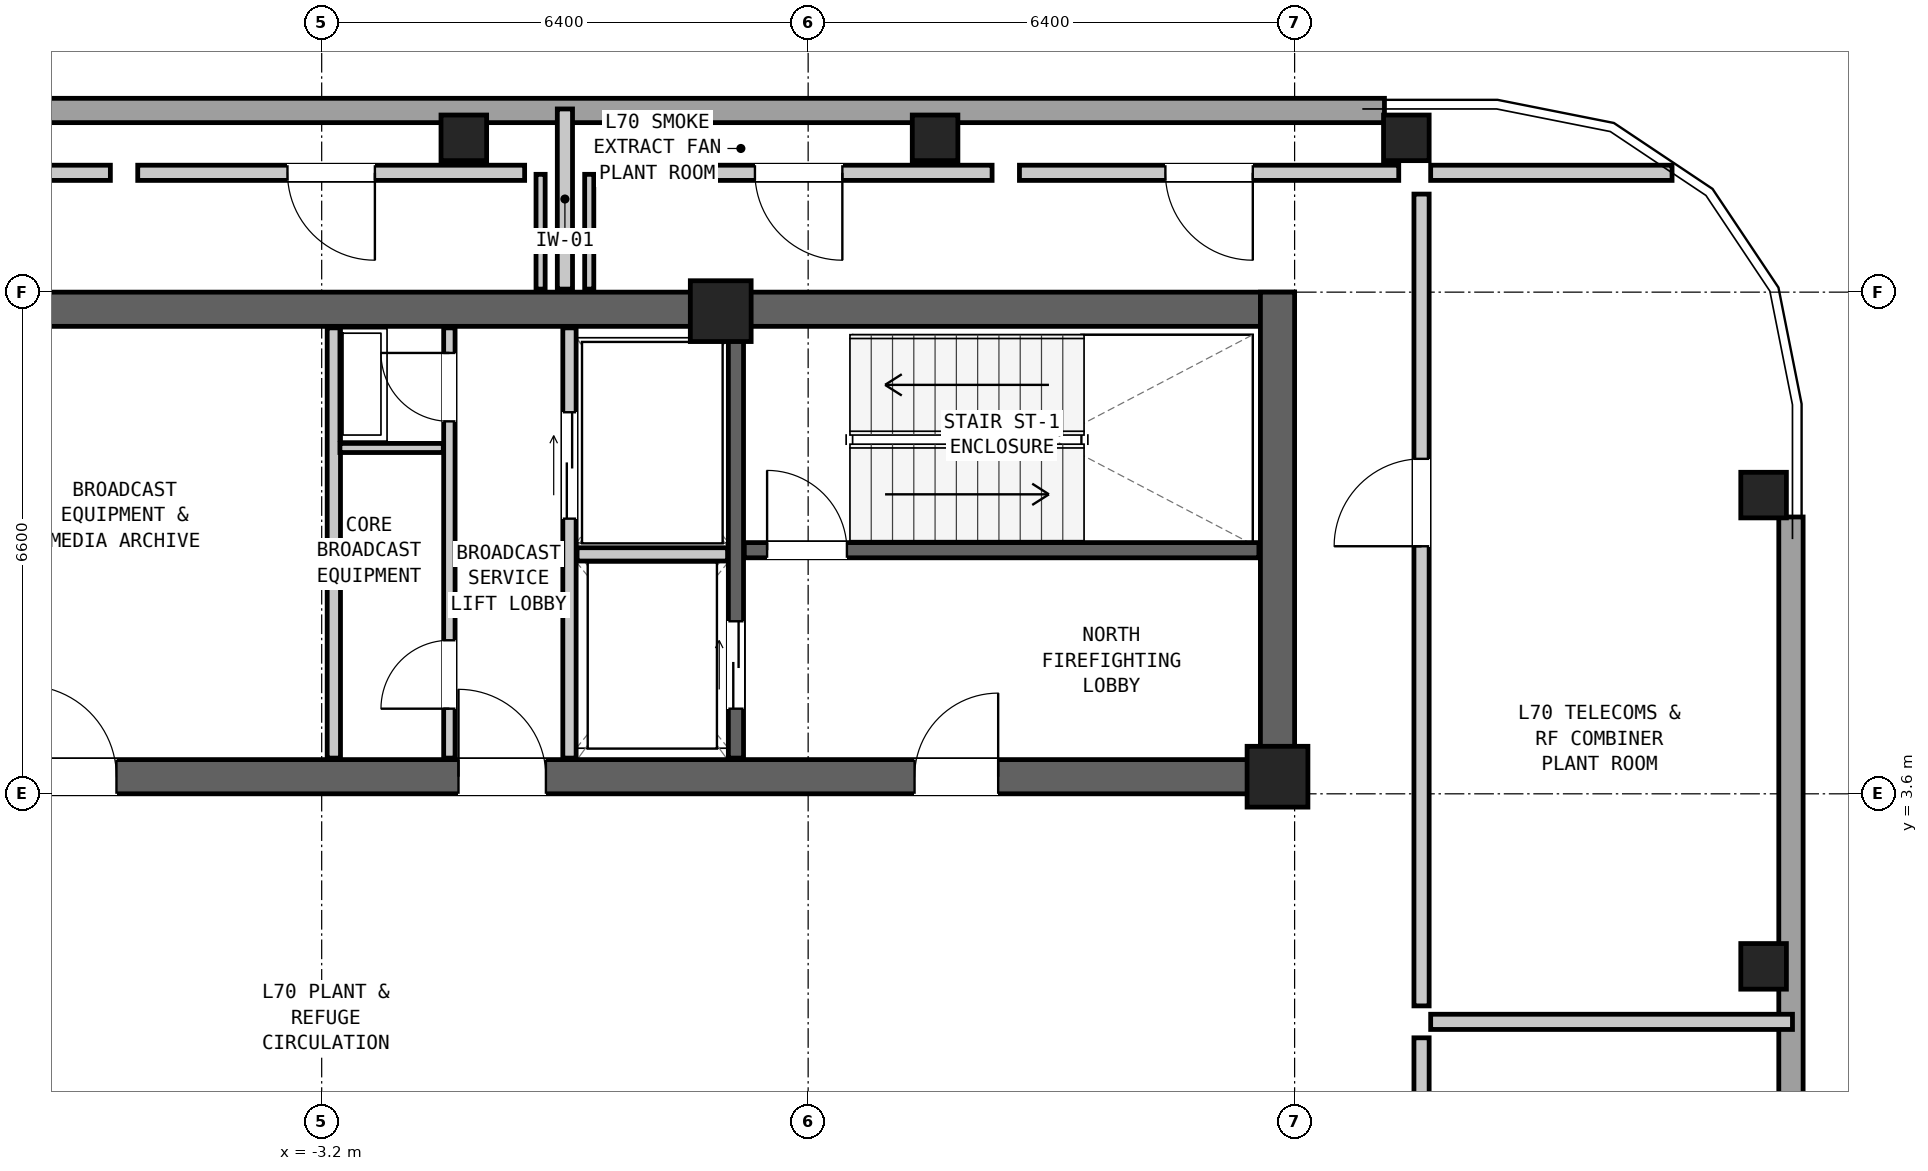
"""IFC4 building model, lengths in metres.
Left out: names, types, materials, properties, quantities, classifications, styles, units other than length and angle.
Written with IfcOpenShell. Run it as: python <this file> out.ifc"""

import sys

from ifc_helpers import new_model, si_unit, direction, frame, frame_2d, origin, origin_2d, place, context, subcontext, project, spatial, rectangle, hollow_rectangle, extrude, element, fill, save


model = new_model("IFC4")
c1 = context("Model", 3, precision=1e-05, world=origin(), true_north=direction((0.0, 1.0)))
c2 = subcontext(c1, "Body", "Model", "MODEL_VIEW")
j1 = project(units=[si_unit("LENGTHUNIT", "METRE"), si_unit("PLANEANGLEUNIT", "RADIAN")], contexts=[c1])
p1 = place(None, origin())
s1 = spatial("IfcSite", under=j1, at=p1, CompositionType="ELEMENT")
p2 = place(p1, origin())
s2 = spatial("IfcBuilding", under=s1, at=p2, CompositionType="ELEMENT")
p3 = place(p2, frame((0.0, 0.0, 238.5)))
s3 = spatial("IfcBuildingStorey", under=s2, at=p3, CompositionType="ELEMENT", Elevation=238.5)
p4 = place(p3, frame((-9.6, 9.975, 0.0), z_axis=(0.0, 0.0, 1.0), x_axis=(1.0, 0.0, 0.0)))
e1 = element("IfcWall", 1, at=p4, inside=s3, PredefinedType="SHEAR", context=c2, shape_type="SweptSolid", body=[
    extrude(rectangle(XDim=19.2, YDim=0.45, at=frame_2d((9.6, 0.0))), origin(), (0.0, 0.0, 1.0), 4.35),
])
p5 = place(p3, frame((-9.6, 3.825, 0.0), z_axis=(0.0, 0.0, 1.0), x_axis=(1.0, 0.0, 0.0)))
e2 = element("IfcWall", 2, at=p5, inside=s3, PredefinedType="SHEAR", context=c2, shape_type="SweptSolid", body=[
    extrude(rectangle(XDim=19.2, YDim=0.45, at=frame_2d((9.6, 0.0))), origin(), (0.0, 0.0, 1.0), 4.35),
])
p6 = place(p5, frame((14.2, 0.0, 0.0)))
e3 = element("IfcOpeningElement", 3, at=p6, cuts=e2, PredefinedType="OPENING", context=c2, shape_type="SweptSolid", body=[
    extrude(rectangle(XDim=1.1, YDim=2.08, at=frame_2d((0.55, 1.04))), frame((0.0, 0.237, 0.0), z_axis=(0.0, -1.0, 0.0), x_axis=(1.0, 0.0, 0.0)), (0.0, 0.0, 1.0), 0.474),
])
p7 = place(p5, frame((8.2, 0.0, 0.0)))
e4 = element("IfcOpeningElement", 4, at=p7, cuts=e2, PredefinedType="OPENING", context=c2, shape_type="SweptSolid", body=[
    extrude(rectangle(XDim=1.15, YDim=2.1, at=frame_2d((0.575, 1.05))), frame((0.0, 0.237, 0.0), z_axis=(0.0, -1.0, 0.0), x_axis=(1.0, 0.0, 0.0)), (0.0, 0.0, 1.0), 0.474),
])
p8 = place(p5, frame((2.5, 0.0, 0.0)))
e5 = element("IfcOpeningElement", 5, at=p8, cuts=e2, PredefinedType="OPENING", context=c2, shape_type="SweptSolid", body=[
    extrude(rectangle(XDim=1.2, YDim=2.1, at=frame_2d((0.6, 1.05))), frame((0.0, 0.237, 0.0), z_axis=(0.0, -1.0, 0.0), x_axis=(1.0, 0.0, 0.0)), (0.0, 0.0, 1.0), 0.474),
])
p9 = place(p3, frame((9.375, 3.6, 0.0), z_axis=(0.0, 0.0, 1.0), x_axis=(0.0, 1.0, 0.0)))
e6 = element("IfcWall", 6, at=p9, inside=s3, PredefinedType="SHEAR", context=c2, shape_type="SweptSolid", body=[
    extrude(rectangle(XDim=6.6, YDim=0.45, at=frame_2d((3.3, 0.0))), origin(), (0.0, 0.0, 1.0), 4.35),
])
for number, where, z_axis, x_axis in (
    (7, (15.77, 1.33, 0.0), (0.0, 0.0, 1.0), (0.0, 1.0, 0.0)),
    (8, (15.77, 7.53, 0.0), (0.0, 0.0, 1.0), (0.0, 1.0, 0.0)),
    (9, (11.07, 12.23, 0.0), (0.0, 0.0, 1.0), (1.0, 0.0, 0.0)),
    (10, (4.87, 12.23, 0.0), (0.0, 0.0, 1.0), (1.0, 0.0, 0.0)),
    (11, (-1.33, 12.23, 0.0), (0.0, 0.0, 1.0), (1.0, 0.0, 0.0)),
):
    element("IfcColumn", number, at=place(p3, frame(where, z_axis=z_axis, x_axis=x_axis)), inside=s3, PredefinedType="COLUMN", context=c2, shape_type="SweptSolid", body=[
        extrude(hollow_rectangle(XDim=0.6, YDim=0.6, WallThickness=0.04, at=origin_2d()), origin(), (0.0, 0.0, 1.0), 4.35),
    ])
for number, where, z_axis, x_axis in (
    (12, (2.05, 9.95, 0.0), (0.0, 0.0, 1.0), (1.0, 0.0, 0.0)),
    (13, (9.375, 3.825, 0.0), (0.0, 0.0, 1.0), (1.0, 0.0, 0.0)),
):
    element("IfcColumn", number, at=place(p3, frame(where, z_axis=z_axis, x_axis=x_axis)), inside=s3, PredefinedType="COLUMN", context=c2, shape_type="SweptSolid", body=[
        extrude(rectangle(XDim=0.8, YDim=0.8, at=origin_2d()), origin(), (0.0, 0.0, 1.0), 4.35),
    ])
for number, where, z_axis, x_axis in (
    (14, (16.13, 7.242, 0.0), (0.0, 0.0, 1.0), (0.0, -1.0, 0.0)),
    (15, (-7.242, 12.59, 0.0), (0.0, 0.0, 1.0), (1.0, 0.0, 0.0)),
):
    element("IfcWall", number, at=place(p3, frame(where, z_axis=z_axis, x_axis=x_axis)), inside=s3, PredefinedType="SOLIDWALL", context=c2, shape_type="SweptSolid", body=[
        extrude(rectangle(XDim=18.024, YDim=0.32, at=frame_2d((9.012, 0.0))), origin(), (0.0, 0.0, 1.0), 2.34),
    ])
p10 = place(p3, frame((2.36, 6.805, 0.0), z_axis=(0.0, 0.0, 1.0), x_axis=(1.0, 0.0, 0.0)))
e16 = element("IfcWall", 16, at=p10, inside=s3, PredefinedType="SHEAR", context=c2, shape_type="SweptSolid", body=[
    extrude(rectangle(XDim=6.77, YDim=0.2, at=frame_2d((3.385, 0.0))), origin(), (0.0, 0.0, 1.0), 4.16),
])
p11 = place(p10, frame((0.3, 0.0, 0.0)))
e17 = element("IfcOpeningElement", 17, at=p11, cuts=e16, PredefinedType="OPENING", context=c2, shape_type="SweptSolid", body=[
    extrude(rectangle(XDim=1.05, YDim=2.08, at=frame_2d((0.525, 1.04))), frame((0.0, 0.112, 0.0), z_axis=(0.0, -1.0, 0.0), x_axis=(1.0, 0.0, 0.0)), (0.0, 0.0, 1.0), 0.224),
])
p12 = place(p3, frame((2.25, 4.07, 0.0), z_axis=(0.0, 0.0, 1.0), x_axis=(0.0, 1.0, 0.0)))
e18 = element("IfcWall", 18, at=p12, inside=s3, PredefinedType="SHEAR", context=c2, shape_type="SweptSolid", body=[
    extrude(rectangle(XDim=5.66, YDim=0.2, at=frame_2d((2.83, 0.0))), origin(), (0.0, 0.0, 1.0), 4.16),
])
p13 = place(p12, frame((0.65, 0.0, 0.0)))
e19 = element("IfcOpeningElement", 19, at=p13, cuts=e18, PredefinedType="OPENING", context=c2, shape_type="SweptSolid", body=[
    extrude(rectangle(XDim=1.15, YDim=2.08, at=frame_2d((0.575, 1.04))), frame((0.0, 0.112, 0.0), z_axis=(0.0, -1.0, 0.0), x_axis=(1.0, 0.0, 0.0)), (0.0, 0.0, 1.0), 0.224),
])
p14 = place(p3, frame((0.06, 4.07, 0.0), z_axis=(0.0, 0.0, 1.0), x_axis=(0.0, 1.0, 0.0)))
e20 = element("IfcWall", 20, at=p14, inside=s3, PredefinedType="PARTITIONING", context=c2, shape_type="SweptSolid", body=[
    extrude(rectangle(XDim=5.66, YDim=0.175, at=frame_2d((2.83, 0.0))), origin(), (0.0, 0.0, 1.0), 4.16),
])
p15 = place(p14, frame((3.15, 0.0, 0.0)))
e21 = element("IfcOpeningElement", 21, at=p15, cuts=e20, PredefinedType="OPENING", context=c2, shape_type="SweptSolid", body=[
    extrude(rectangle(XDim=1.4, YDim=2.12, at=frame_2d((0.7, 1.06))), frame((0.0, 0.1, 0.0), z_axis=(0.0, -1.0, 0.0), x_axis=(1.0, 0.0, 0.0)), (0.0, 0.0, 1.0), 0.199),
])
p16 = place(p3, frame((0.16, 6.75, 0.0), z_axis=(0.0, 0.0, 1.0), x_axis=(1.0, 0.0, 0.0)))
e22 = element("IfcWall", 22, at=p16, inside=s3, PredefinedType="PARTITIONING", context=c2, shape_type="SweptSolid", body=[
    extrude(rectangle(XDim=1.98, YDim=0.175, at=frame_2d((0.99, 0.0))), origin(), (0.0, 0.0, 1.0), 4.16),
])
p17 = place(p3, frame((-3.04, 4.07, 0.0), z_axis=(0.0, 0.0, 1.0), x_axis=(0.0, 1.0, 0.0)))
e23 = element("IfcWall", 23, at=p17, inside=s3, PredefinedType="PARTITIONING", context=c2, shape_type="SweptSolid", body=[
    extrude(rectangle(XDim=5.66, YDim=0.175, at=frame_2d((2.83, 0.0))), origin(), (0.0, 0.0, 1.0), 4.16),
])
p18 = place(p3, frame((-1.52, 4.07, 0.0), z_axis=(0.0, 0.0, 1.0), x_axis=(0.0, 1.0, 0.0)))
e24 = element("IfcWall", 24, at=p18, inside=s3, PredefinedType="PARTITIONING", context=c2, shape_type="SweptSolid", body=[
    extrude(rectangle(XDim=5.66, YDim=0.15, at=frame_2d((2.83, 0.0))), origin(), (0.0, 0.0, 1.0), 4.16),
])
p19 = place(p18, frame((4.43, 0.0, 0.0)))
e25 = element("IfcOpeningElement", 25, at=p19, cuts=e24, PredefinedType="OPENING", context=c2, shape_type="SweptSolid", body=[
    extrude(rectangle(XDim=0.9, YDim=2.05, at=frame_2d((0.45, 1.025))), frame((0.0, 0.087, 0.0), z_axis=(0.0, -1.0, 0.0), x_axis=(1.0, 0.0, 0.0)), (0.0, 0.0, 1.0), 0.174),
])
p20 = place(p18, frame((0.65, 0.0, 0.0)))
e26 = element("IfcOpeningElement", 26, at=p20, cuts=e24, PredefinedType="OPENING", context=c2, shape_type="SweptSolid", body=[
    extrude(rectangle(XDim=0.9, YDim=2.05, at=frame_2d((0.45, 1.025))), frame((0.0, 0.087, 0.0), z_axis=(0.0, -1.0, 0.0), x_axis=(1.0, 0.0, 0.0)), (0.0, 0.0, 1.0), 0.174),
])
p21 = place(p3, frame((-2.96, 8.15, 0.0), z_axis=(0.0, 0.0, 1.0), x_axis=(1.0, 0.0, 0.0)))
e27 = element("IfcWall", 27, at=p21, inside=s3, PredefinedType="PARTITIONING", context=c2, shape_type="SweptSolid", body=[
    extrude(rectangle(XDim=1.36, YDim=0.12, at=frame_2d((0.68, 0.0))), origin(), (0.0, 0.0, 1.0), 4.16),
])
p22 = place(p3, frame((0.0, 10.24, 0.0), z_axis=(0.0, 0.0, 1.0), x_axis=(0.0, 1.0, 0.0)))
e28 = element("IfcWall", 28, at=p22, inside=s3, PredefinedType="PARTITIONING", context=c2, shape_type="SweptSolid", body=[
    extrude(rectangle(XDim=2.37, YDim=0.2, at=frame_2d((1.185, 0.0))), origin(), (0.0, 0.0, 1.0), 2.34),
])
for number, where, z_axis, x_axis in (
    (29, (-0.32, 10.24, 0.0), (0.0, 0.0, 1.0), (0.0, 1.0, 0.0)),
    (30, (0.32, 10.24, 0.0), (0.0, 0.0, 1.0), (0.0, 1.0, 0.0)),
):
    element("IfcWall", number, at=place(p3, frame(where, z_axis=z_axis, x_axis=x_axis)), inside=s3, PredefinedType="PARTITIONING", context=c2, shape_type="SweptSolid", body=[
        extrude(rectangle(XDim=1.51, YDim=0.12, at=frame_2d((0.755, 0.0))), origin(), (0.0, 0.0, 1.0), 2.34),
    ])
p23 = place(p3, frame((-5.98, 11.77, 0.0), z_axis=(0.0, 0.0, 1.0), x_axis=(-1.0, 0.0, 0.0)))
e31 = element("IfcWall", 31, at=p23, inside=s3, PredefinedType="PARTITIONING", context=c2, shape_type="SweptSolid", body=[
    extrude(rectangle(XDim=5.046, YDim=0.2, at=frame_2d((2.523, 0.0))), origin(), (0.0, 0.0, 1.0), 2.34),
])
p24 = place(p23, frame((3.546, 0.0, 0.0)))
e32 = element("IfcOpeningElement", 32, at=p24, cuts=e31, PredefinedType="OPENING", context=c2, shape_type="SweptSolid", body=[
    extrude(rectangle(XDim=1.15, YDim=2.1, at=frame_2d((0.575, 1.05))), frame((0.0, 0.112, 0.0), z_axis=(0.0, -1.0, 0.0), x_axis=(1.0, 0.0, 0.0)), (0.0, 0.0, 1.0), 0.224),
])
p25 = place(p3, frame((-0.53, 11.77, 0.0), z_axis=(0.0, 0.0, 1.0), x_axis=(-1.0, 0.0, 0.0)))
e33 = element("IfcWall", 33, at=p25, inside=s3, PredefinedType="PARTITIONING", context=c2, shape_type="SweptSolid", body=[
    extrude(rectangle(XDim=5.09, YDim=0.2, at=frame_2d((2.545, 0.0))), origin(), (0.0, 0.0, 1.0), 2.34),
])
p26 = place(p25, frame((1.97, 0.0, 0.0)))
e34 = element("IfcOpeningElement", 34, at=p26, cuts=e33, PredefinedType="OPENING", context=c2, shape_type="SweptSolid", body=[
    extrude(rectangle(XDim=1.15, YDim=2.1, at=frame_2d((0.575, 1.05))), frame((0.0, 0.112, 0.0), z_axis=(0.0, -1.0, 0.0), x_axis=(1.0, 0.0, 0.0)), (0.0, 0.0, 1.0), 0.224),
])
p27 = place(p3, frame((5.62, 11.77, 0.0), z_axis=(0.0, 0.0, 1.0), x_axis=(-1.0, 0.0, 0.0)))
e35 = element("IfcWall", 35, at=p27, inside=s3, PredefinedType="PARTITIONING", context=c2, shape_type="SweptSolid", body=[
    extrude(rectangle(XDim=5.09, YDim=0.2, at=frame_2d((2.545, 0.0))), origin(), (0.0, 0.0, 1.0), 2.34),
])
p28 = place(p27, frame((1.97, 0.0, 0.0)))
e36 = element("IfcOpeningElement", 36, at=p28, cuts=e35, PredefinedType="OPENING", context=c2, shape_type="SweptSolid", body=[
    extrude(rectangle(XDim=1.15, YDim=2.1, at=frame_2d((0.575, 1.05))), frame((0.0, 0.112, 0.0), z_axis=(0.0, -1.0, 0.0), x_axis=(1.0, 0.0, 0.0)), (0.0, 0.0, 1.0), 0.224),
])
p29 = place(p3, frame((10.97, 11.77, 0.0), z_axis=(0.0, 0.0, 1.0), x_axis=(-1.0, 0.0, 0.0)))
e37 = element("IfcWall", 37, at=p29, inside=s3, PredefinedType="PARTITIONING", context=c2, shape_type="SweptSolid", body=[
    extrude(rectangle(XDim=4.99, YDim=0.2, at=frame_2d((2.495, 0.0))), origin(), (0.0, 0.0, 1.0), 2.34),
])
p30 = place(p29, frame((1.92, 0.0, 0.0)))
e38 = element("IfcOpeningElement", 38, at=p30, cuts=e37, PredefinedType="OPENING", context=c2, shape_type="SweptSolid", body=[
    extrude(rectangle(XDim=1.15, YDim=2.1, at=frame_2d((0.575, 1.05))), frame((0.0, 0.112, 0.0), z_axis=(0.0, -1.0, 0.0), x_axis=(1.0, 0.0, 0.0)), (0.0, 0.0, 1.0), 0.224),
])
p31 = place(p3, frame((11.39, 11.77, 0.0), z_axis=(0.0, 0.0, 1.0), x_axis=(1.0, 0.0, 0.0)))
e39 = element("IfcWall", 39, at=p31, inside=s3, PredefinedType="PARTITIONING", context=c2, shape_type="SweptSolid", body=[
    extrude(rectangle(XDim=3.176, YDim=0.2, at=frame_2d((1.588, 0.0))), origin(), (0.0, 0.0, 1.0), 4.16),
])
p32 = place(p3, frame((11.39, 0.6, 0.0), z_axis=(0.0, 0.0, 1.0), x_axis=(1.0, 0.0, 0.0)))
e40 = element("IfcWall", 40, at=p32, inside=s3, PredefinedType="PARTITIONING", context=c2, shape_type="SweptSolid", body=[
    extrude(rectangle(XDim=4.76, YDim=0.2, at=frame_2d((2.38, 0.0))), origin(), (0.0, 0.0, 1.0), 2.34),
])
p33 = place(p3, frame((11.27, -10.29, 0.0), z_axis=(0.0, 0.0, 1.0), x_axis=(0.0, 1.0, 0.0)))
e41 = element("IfcWall", 41, at=p33, inside=s3, PredefinedType="PARTITIONING", context=c2, shape_type="SweptSolid", body=[
    extrude(rectangle(XDim=10.68, YDim=0.2, at=frame_2d((5.34, 0.0))), origin(), (0.0, 0.0, 1.0), 4.16),
])
p34 = place(p33, frame((4.765, 0.0, 0.0)))
e42 = element("IfcOpeningElement", 42, at=p34, cuts=e41, PredefinedType="OPENING", context=c2, shape_type="SweptSolid", body=[
    extrude(rectangle(XDim=1.15, YDim=2.1, at=frame_2d((0.575, 1.05))), frame((0.0, 0.112, 0.0), z_axis=(0.0, -1.0, 0.0), x_axis=(1.0, 0.0, 0.0)), (0.0, 0.0, 1.0), 0.224),
])
p35 = place(p3, frame((11.27, 0.81, 0.0), z_axis=(0.0, 0.0, 1.0), x_axis=(0.0, 1.0, 0.0)))
e43 = element("IfcWall", 43, at=p35, inside=s3, PredefinedType="PARTITIONING", context=c2, shape_type="SweptSolid", body=[
    extrude(rectangle(XDim=10.68, YDim=0.2, at=frame_2d((5.34, 0.0))), origin(), (0.0, 0.0, 1.0), 4.16),
])
p36 = place(p35, frame((6.047, 0.0, 0.0)))
e44 = element("IfcOpeningElement", 44, at=p36, cuts=e43, PredefinedType="OPENING", context=c2, shape_type="SweptSolid", body=[
    extrude(rectangle(XDim=1.15, YDim=2.1, at=frame_2d((0.575, 1.05))), frame((0.0, 0.112, 0.0), z_axis=(0.0, -1.0, 0.0), x_axis=(1.0, 0.0, 0.0)), (0.0, 0.0, 1.0), 0.224),
])
p37 = place(p11, origin())
e45 = element("IfcDoor", 45, at=p37, inside=s3, OperationType="SINGLE_SWING_LEFT", PredefinedType="DOOR", context=c2, shape_type="SweptSolid", body=[
    extrude(rectangle(XDim=1.05, YDim=2.08, at=frame_2d((0.525, 1.04))), frame((0.0, 0.025, 0.0), z_axis=(0.0, -1.0, 0.0), x_axis=(1.0, 0.0, 0.0)), (0.0, 0.0, 1.0), 0.05),
])
fill(e17, e45)
p38 = place(p6, origin())
e46 = element("IfcDoor", 46, at=p38, inside=s3, OperationType="SINGLE_SWING_RIGHT", PredefinedType="DOOR", context=c2, shape_type="SweptSolid", body=[
    extrude(rectangle(XDim=1.1, YDim=2.08, at=frame_2d((0.55, 1.04))), frame((0.0, 0.025, 0.0), z_axis=(0.0, -1.0, 0.0), x_axis=(1.0, 0.0, 0.0)), (0.0, 0.0, 1.0), 0.05),
])
fill(e3, e46)
p39 = place(p13, origin())
e47 = element("IfcDoor", 47, at=p39, inside=s3, OperationType="DOUBLE_DOOR_SLIDING", PredefinedType="DOOR", context=c2, shape_type="SweptSolid", body=[
    extrude(rectangle(XDim=1.15, YDim=2.08, at=frame_2d((0.575, 1.04))), frame((0.0, 0.025, 0.0), z_axis=(0.0, -1.0, 0.0), x_axis=(1.0, 0.0, 0.0)), (0.0, 0.0, 1.0), 0.05),
])
fill(e19, e47)
p40 = place(p15, origin())
e48 = element("IfcDoor", 48, at=p40, inside=s3, OperationType="DOUBLE_DOOR_SLIDING", PredefinedType="DOOR", context=c2, shape_type="SweptSolid", body=[
    extrude(rectangle(XDim=1.4, YDim=2.12, at=frame_2d((0.7, 1.06))), frame((0.0, 0.025, 0.0), z_axis=(0.0, -1.0, 0.0), x_axis=(1.0, 0.0, 0.0)), (0.0, 0.0, 1.0), 0.05),
])
fill(e21, e48)
p41 = place(p7, origin())
e49 = element("IfcDoor", 49, at=p41, inside=s3, OperationType="SINGLE_SWING_LEFT", PredefinedType="DOOR", context=c2, shape_type="SweptSolid", body=[
    extrude(rectangle(XDim=1.15, YDim=2.1, at=frame_2d((0.575, 1.05))), frame((0.0, 0.025, 0.0), z_axis=(0.0, -1.0, 0.0), x_axis=(1.0, 0.0, 0.0)), (0.0, 0.0, 1.0), 0.05),
])
fill(e4, e49)
p42 = place(p19, origin())
e50 = element("IfcDoor", 50, at=p42, inside=s3, OperationType="SINGLE_SWING_RIGHT", PredefinedType="DOOR", context=c2, shape_type="SweptSolid", body=[
    extrude(rectangle(XDim=0.9, YDim=2.05, at=frame_2d((0.45, 1.025))), frame((0.0, 0.025, 0.0), z_axis=(0.0, -1.0, 0.0), x_axis=(1.0, 0.0, 0.0)), (0.0, 0.0, 1.0), 0.05),
])
fill(e25, e50)
p43 = place(p20, origin())
e51 = element("IfcDoor", 51, at=p43, inside=s3, OperationType="SINGLE_SWING_LEFT", PredefinedType="DOOR", context=c2, shape_type="SweptSolid", body=[
    extrude(rectangle(XDim=0.9, YDim=2.05, at=frame_2d((0.45, 1.025))), frame((0.0, 0.025, 0.0), z_axis=(0.0, -1.0, 0.0), x_axis=(1.0, 0.0, 0.0)), (0.0, 0.0, 1.0), 0.05),
])
fill(e26, e51)
p44 = place(p8, origin())
e52 = element("IfcDoor", 52, at=p44, inside=s3, OperationType="SINGLE_SWING_LEFT", PredefinedType="DOOR", context=c2, shape_type="SweptSolid", body=[
    extrude(rectangle(XDim=1.2, YDim=2.1, at=frame_2d((0.6, 1.05))), frame((0.0, 0.025, 0.0), z_axis=(0.0, -1.0, 0.0), x_axis=(1.0, 0.0, 0.0)), (0.0, 0.0, 1.0), 0.05),
])
fill(e5, e52)
p45 = place(p26, origin())
e53 = element("IfcDoor", 53, at=p45, inside=s3, OperationType="SINGLE_SWING_LEFT", PredefinedType="DOOR", context=c2, shape_type="SweptSolid", body=[
    extrude(rectangle(XDim=1.15, YDim=2.1, at=frame_2d((0.575, 1.05))), frame((0.0, 0.025, 0.0), z_axis=(0.0, -1.0, 0.0), x_axis=(1.0, 0.0, 0.0)), (0.0, 0.0, 1.0), 0.05),
])
fill(e34, e53)
p46 = place(p28, origin())
e54 = element("IfcDoor", 54, at=p46, inside=s3, OperationType="SINGLE_SWING_LEFT", PredefinedType="DOOR", context=c2, shape_type="SweptSolid", body=[
    extrude(rectangle(XDim=1.15, YDim=2.1, at=frame_2d((0.575, 1.05))), frame((0.0, 0.025, 0.0), z_axis=(0.0, -1.0, 0.0), x_axis=(1.0, 0.0, 0.0)), (0.0, 0.0, 1.0), 0.05),
])
fill(e36, e54)
p47 = place(p30, origin())
e55 = element("IfcDoor", 55, at=p47, inside=s3, OperationType="SINGLE_SWING_LEFT", PredefinedType="DOOR", context=c2, shape_type="SweptSolid", body=[
    extrude(rectangle(XDim=1.15, YDim=2.1, at=frame_2d((0.575, 1.05))), frame((0.0, 0.025, 0.0), z_axis=(0.0, -1.0, 0.0), x_axis=(1.0, 0.0, 0.0)), (0.0, 0.0, 1.0), 0.05),
])
fill(e38, e55)
p48 = place(p36, origin())
e56 = element("IfcDoor", 56, at=p48, inside=s3, OperationType="SINGLE_SWING_LEFT", PredefinedType="DOOR", context=c2, shape_type="SweptSolid", body=[
    extrude(rectangle(XDim=1.15, YDim=2.1, at=frame_2d((0.575, 1.05))), frame((0.0, 0.025, 0.0), z_axis=(0.0, -1.0, 0.0), x_axis=(1.0, 0.0, 0.0)), (0.0, 0.0, 1.0), 0.05),
])
fill(e44, e56)
save(model, sys.argv[1])
